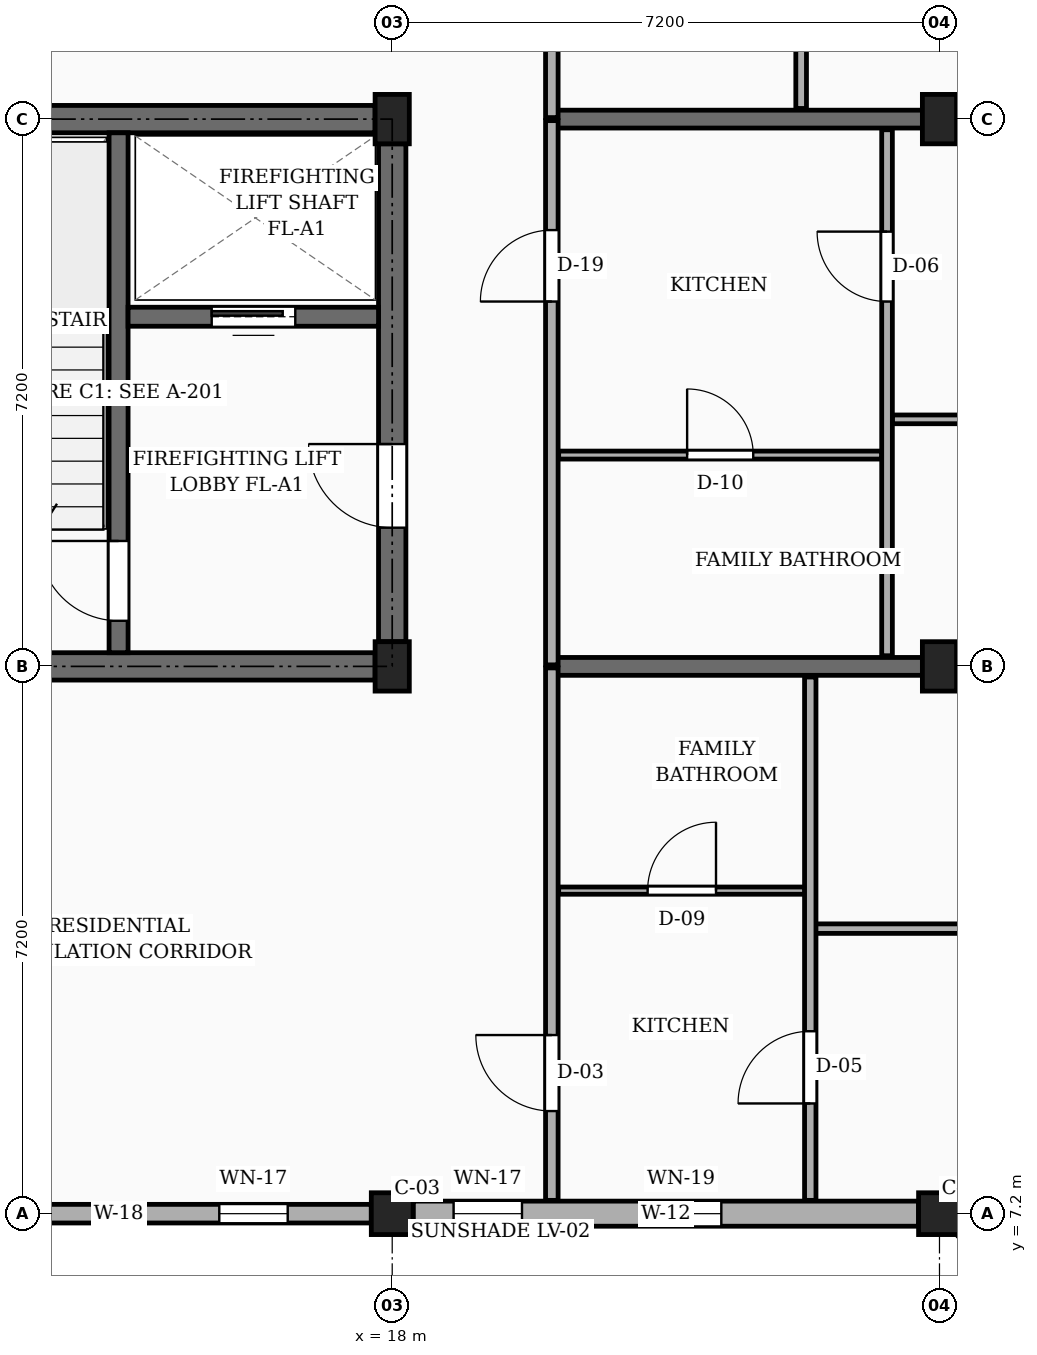
"""IFC4 building model, lengths in metres.
Left out: names, types, materials, properties, quantities, classifications, styles, units other than length and angle.
Written with IfcOpenShell. Run it as: python <this file> out.ifc"""

import sys

from ifc_helpers import new_model, si_unit, direction, frame, frame_2d, origin, origin_2d, place, context, subcontext, project, spatial, rectangle, extrude, element, fill, save


model = new_model("IFC4")
c1 = context("Model", 3, precision=1e-05, world=origin(), true_north=direction((0.0, 1.0)))
c2 = subcontext(c1, "Body", "Model", "MODEL_VIEW")
j1 = project(units=[si_unit("LENGTHUNIT", "METRE"), si_unit("PLANEANGLEUNIT", "RADIAN")], contexts=[c1])
p1 = place(None, origin())
s1 = spatial("IfcSite", under=j1, at=p1, CompositionType="ELEMENT")
p2 = place(p1, origin())
s2 = spatial("IfcBuilding", under=s1, at=p2, CompositionType="ELEMENT")
p3 = place(p2, frame((0.0, 0.0, 17.1)))
s3 = spatial("IfcBuildingStorey", under=s2, at=p3, CompositionType="ELEMENT", Elevation=17.1)
p4 = place(p3, frame((18.0, 7.2, 0.0), z_axis=(0.0, 0.0, 1.0), x_axis=(1.0, 0.0, 0.0)))
e1 = element("IfcColumn", 1, at=p4, inside=s3, PredefinedType="COLUMN", context=c2, shape_type="SweptSolid", body=[
    extrude(rectangle(XDim=0.55, YDim=0.55, at=origin_2d()), origin(), (0.0, 0.0, 1.0), 3.15),
])
for number, where, z_axis, x_axis in (
    (2, (18.0, 14.4, 0.0), (0.0, 0.0, 1.0), (1.0, 0.0, 0.0)),
    (3, (18.0, 21.6, 0.0), (0.0, 0.0, 1.0), (1.0, 0.0, 0.0)),
):
    element("IfcColumn", number, at=place(p3, frame(where, z_axis=z_axis, x_axis=x_axis)), inside=s3, PredefinedType="COLUMN", context=c2, shape_type="SweptSolid", body=[
        extrude(rectangle(XDim=0.45, YDim=0.65, at=origin_2d()), origin(), (0.0, 0.0, 1.0), 3.15),
    ])
p5 = place(p3, frame((25.2, 7.2, 0.0), z_axis=(0.0, 0.0, 1.0), x_axis=(1.0, 0.0, 0.0)))
e4 = element("IfcColumn", 4, at=p5, inside=s3, PredefinedType="COLUMN", context=c2, shape_type="SweptSolid", body=[
    extrude(rectangle(XDim=0.55, YDim=0.55, at=origin_2d()), origin(), (0.0, 0.0, 1.0), 3.15),
])
for number, where, z_axis, x_axis in (
    (5, (25.2, 14.4, 0.0), (0.0, 0.0, 1.0), (1.0, 0.0, 0.0)),
    (6, (25.2, 21.6, 0.0), (0.0, 0.0, 1.0), (1.0, 0.0, 0.0)),
):
    element("IfcColumn", number, at=place(p3, frame(where, z_axis=z_axis, x_axis=x_axis)), inside=s3, PredefinedType="COLUMN", context=c2, shape_type="SweptSolid", body=[
        extrude(rectangle(XDim=0.45, YDim=0.65, at=origin_2d()), origin(), (0.0, 0.0, 1.0), 3.15),
    ])
for number, where, z_axis, x_axis in (
    (7, (20.1, 14.4, 0.0), (0.0, 0.0, 1.0), (1.0, 0.0, 0.0)),
    (8, (20.1, 21.6, 0.0), (0.0, 0.0, 1.0), (1.0, 0.0, 0.0)),
):
    element("IfcWall", number, at=place(p3, frame(where, z_axis=z_axis, x_axis=x_axis)), inside=s3, PredefinedType="SOLIDWALL", context=c2, shape_type="SweptSolid", body=[
        extrude(rectangle(XDim=12.025, YDim=0.235, at=frame_2d((6.012, 0.0))), origin(), (0.0, 0.0, 1.0), 2.17),
    ])
p6 = place(p3, frame((11.075, 7.2, 0.0), z_axis=(0.0, 0.0, 1.0), x_axis=(1.0, 0.0, 0.0)))
e9 = element("IfcWall", 9, at=p6, inside=s3, PredefinedType="SOLIDWALL", context=c2, shape_type="SweptSolid", body=[
    extrude(rectangle(XDim=6.65, YDim=0.245, at=frame_2d((3.325, 0.0))), origin(), (0.0, 0.0, 1.0), 2.44),
])
p7 = place(p6, frame((0.45, 0.0, 0.78)))
e10 = element("IfcOpeningElement", 10, at=p7, cuts=e9, PredefinedType="OPENING", context=c2, shape_type="SweptSolid", body=[
    extrude(rectangle(XDim=1.36, YDim=1.26, at=frame_2d((0.68, 0.63))), frame((0.0, 0.133, 0.0), z_axis=(0.0, -1.0, 0.0), x_axis=(1.0, 0.0, 0.0)), (0.0, 0.0, 1.0), 0.265),
])
p8 = place(p6, frame((4.65, 0.0, 0.78)))
e11 = element("IfcOpeningElement", 11, at=p8, cuts=e9, PredefinedType="OPENING", context=c2, shape_type="SweptSolid", body=[
    extrude(rectangle(XDim=0.9, YDim=1.36, at=frame_2d((0.45, 0.68))), frame((0.0, 0.133, 0.0), z_axis=(0.0, -1.0, 0.0), x_axis=(1.0, 0.0, 0.0)), (0.0, 0.0, 1.0), 0.265),
])
p9 = place(p3, frame((18.275, 7.2, 0.0), z_axis=(0.0, 0.0, 1.0), x_axis=(1.0, 0.0, 0.0)))
e12 = element("IfcWall", 12, at=p9, inside=s3, PredefinedType="SOLIDWALL", context=c2, shape_type="SweptSolid", body=[
    extrude(rectangle(XDim=6.65, YDim=0.33, at=frame_2d((3.325, 0.0))), origin(), (0.0, 0.0, 1.0), 2.44),
])
p10 = place(p9, frame((0.532, 0.0, 0.78)))
e13 = element("IfcOpeningElement", 13, at=p10, cuts=e12, PredefinedType="OPENING", context=c2, shape_type="SweptSolid", body=[
    extrude(rectangle(XDim=0.9, YDim=1.36, at=frame_2d((0.45, 0.68))), frame((0.0, 0.175, 0.0), z_axis=(0.0, -1.0, 0.0), x_axis=(1.0, 0.0, 0.0)), (0.0, 0.0, 1.0), 0.35),
])
p11 = place(p9, frame((2.995, 0.0, 0.78)))
e14 = element("IfcOpeningElement", 14, at=p11, cuts=e12, PredefinedType="OPENING", context=c2, shape_type="SweptSolid", body=[
    extrude(rectangle(XDim=1.06, YDim=1.36, at=frame_2d((0.53, 0.68))), frame((0.0, 0.175, 0.0), z_axis=(0.0, -1.0, 0.0), x_axis=(1.0, 0.0, 0.0)), (0.0, 0.0, 1.0), 0.35),
])
p12 = place(p3, frame((11.025, 21.6, 0.0), z_axis=(0.0, 0.0, 1.0), x_axis=(1.0, 0.0, 0.0)))
e15 = element("IfcWall", 15, at=p12, inside=s3, PredefinedType="SHEAR", context=c2, shape_type="SweptSolid", body=[
    extrude(rectangle(XDim=6.75, YDim=0.36, at=frame_2d((3.375, 0.0))), origin(), (0.0, 0.0, 1.0), 2.87),
])
p13 = place(p3, frame((18.0, 14.725, 0.0), z_axis=(0.0, 0.0, 1.0), x_axis=(0.0, 1.0, 0.0)))
e16 = element("IfcWall", 16, at=p13, inside=s3, PredefinedType="SHEAR", context=c2, shape_type="SweptSolid", body=[
    extrude(rectangle(XDim=6.55, YDim=0.36, at=frame_2d((3.275, 0.0))), origin(), (0.0, 0.0, 1.0), 2.87),
])
p14 = place(p13, frame((1.5, 0.0, 0.0)))
e17 = element("IfcOpeningElement", 17, at=p14, cuts=e16, PredefinedType="OPENING", context=c2, shape_type="SweptSolid", body=[
    extrude(rectangle(XDim=1.1, YDim=2.15, at=frame_2d((0.55, 1.075))), frame((0.0, 0.19, 0.0), z_axis=(0.0, -1.0, 0.0), x_axis=(1.0, 0.0, 0.0)), (0.0, 0.0, 1.0), 0.38),
])
p15 = place(p3, frame((11.025, 14.4, 0.0), z_axis=(0.0, 0.0, 1.0), x_axis=(1.0, 0.0, 0.0)))
e18 = element("IfcWall", 18, at=p15, inside=s3, PredefinedType="SHEAR", context=c2, shape_type="SweptSolid", body=[
    extrude(rectangle(XDim=6.75, YDim=0.36, at=frame_2d((3.375, 0.0))), origin(), (0.0, 0.0, 1.0), 2.87),
])
p16 = place(p3, frame((14.4, 14.58, 0.0), z_axis=(0.0, 0.0, 1.0), x_axis=(0.0, 1.0, 0.0)))
e19 = element("IfcWall", 19, at=p16, inside=s3, PredefinedType="SHEAR", context=c2, shape_type="SweptSolid", body=[
    extrude(rectangle(XDim=6.84, YDim=0.25, at=frame_2d((3.42, 0.0))), origin(), (0.0, 0.0, 1.0), 2.87),
])
p17 = place(p16, frame((0.42, 0.0, 0.0)))
e20 = element("IfcOpeningElement", 20, at=p17, cuts=e19, PredefinedType="OPENING", context=c2, shape_type="SweptSolid", body=[
    extrude(rectangle(XDim=1.05, YDim=2.15, at=frame_2d((0.525, 1.075))), frame((0.0, 0.135, 0.0), z_axis=(0.0, -1.0, 0.0), x_axis=(1.0, 0.0, 0.0)), (0.0, 0.0, 1.0), 0.27),
])
p18 = place(p3, frame((14.525, 19.0, 0.0), z_axis=(0.0, 0.0, 1.0), x_axis=(1.0, 0.0, 0.0)))
e21 = element("IfcWall", 21, at=p18, inside=s3, PredefinedType="SHEAR", context=c2, shape_type="SweptSolid", body=[
    extrude(rectangle(XDim=3.295, YDim=0.25, at=frame_2d((1.647, 0.0))), origin(), (0.0, 0.0, 1.0), 2.87),
])
p19 = place(p18, frame((1.1, 0.0, 0.0)))
e22 = element("IfcOpeningElement", 22, at=p19, cuts=e21, PredefinedType="OPENING", context=c2, shape_type="SweptSolid", body=[
    extrude(rectangle(XDim=1.1, YDim=2.2, at=frame_2d((0.55, 1.1))), frame((0.0, 0.135, 0.0), z_axis=(0.0, -1.0, 0.0), x_axis=(1.0, 0.0, 0.0)), (0.0, 0.0, 1.0), 0.27),
])
p20 = place(p3, frame((20.1, 7.375, 0.0), z_axis=(0.0, 0.0, 1.0), x_axis=(0.0, 1.0, 0.0)))
e23 = element("IfcWall", 23, at=p20, inside=s3, PredefinedType="PARTITIONING", context=c2, shape_type="SweptSolid", body=[
    extrude(rectangle(XDim=7.005, YDim=0.165, at=frame_2d((3.502, 0.0))), origin(), (0.0, 0.0, 1.0), 2.305),
])
p21 = place(p20, frame((1.175, 0.0, 0.0)))
e24 = element("IfcOpeningElement", 24, at=p21, cuts=e23, PredefinedType="OPENING", context=c2, shape_type="SweptSolid", body=[
    extrude(rectangle(XDim=1.0, YDim=2.15, at=frame_2d((0.5, 1.075))), frame((0.0, 0.093, 0.0), z_axis=(0.0, -1.0, 0.0), x_axis=(1.0, 0.0, 0.0)), (0.0, 0.0, 1.0), 0.185),
])
p22 = place(p3, frame((20.1, 14.42, 0.0), z_axis=(0.0, 0.0, 1.0), x_axis=(0.0, 1.0, 0.0)))
e25 = element("IfcWall", 25, at=p22, inside=s3, PredefinedType="PARTITIONING", context=c2, shape_type="SweptSolid", body=[
    extrude(rectangle(XDim=7.16, YDim=0.165, at=frame_2d((3.58, 0.0))), origin(), (0.0, 0.0, 1.0), 2.305),
])
p23 = place(p22, frame((4.78, 0.0, 0.0)))
e26 = element("IfcOpeningElement", 26, at=p23, cuts=e25, PredefinedType="OPENING", context=c2, shape_type="SweptSolid", body=[
    extrude(rectangle(XDim=0.94, YDim=2.12, at=frame_2d((0.47, 1.06))), frame((0.0, 0.093, 0.0), z_axis=(0.0, -1.0, 0.0), x_axis=(1.0, 0.0, 0.0)), (0.0, 0.0, 1.0), 0.185),
])
p24 = place(p3, frame((20.1, 21.62, 0.0), z_axis=(0.0, 0.0, 1.0), x_axis=(0.0, 1.0, 0.0)))
e27 = element("IfcWall", 27, at=p24, inside=s3, PredefinedType="PARTITIONING", context=c2, shape_type="SweptSolid", body=[
    extrude(rectangle(XDim=7.16, YDim=0.165, at=frame_2d((3.58, 0.0))), origin(), (0.0, 0.0, 1.0), 2.305),
])
p25 = place(p24, frame((1.33, 0.0, 0.0)))
e28 = element("IfcOpeningElement", 28, at=p25, cuts=e27, PredefinedType="OPENING", context=c2, shape_type="SweptSolid", body=[
    extrude(rectangle(XDim=1.14, YDim=2.18, at=frame_2d((0.57, 1.09))), frame((0.0, 0.093, 0.0), z_axis=(0.0, -1.0, 0.0), x_axis=(1.0, 0.0, 0.0)), (0.0, 0.0, 1.0), 0.185),
])
p26 = place(p3, frame((23.57, 10.95, 0.0), z_axis=(0.0, 0.0, 1.0), x_axis=(1.0, 0.0, 0.0)))
e29 = element("IfcWall", 29, at=p26, inside=s3, PredefinedType="PARTITIONING", context=c2, shape_type="SweptSolid", body=[
    extrude(rectangle(XDim=8.655, YDim=0.125, at=frame_2d((4.328, 0.0))), origin(), (0.0, 0.0, 1.0), 2.305),
])
p27 = place(p26, frame((3.877, 0.0, 0.0)))
e30 = element("IfcOpeningElement", 30, at=p27, cuts=e29, PredefinedType="OPENING", context=c2, shape_type="SweptSolid", body=[
    extrude(rectangle(XDim=0.9, YDim=2.1, at=frame_2d((0.45, 1.05))), frame((0.0, 0.073, 0.0), z_axis=(0.0, -1.0, 0.0), x_axis=(1.0, 0.0, 0.0)), (0.0, 0.0, 1.0), 0.145),
])
p28 = place(p3, frame((20.19, 11.45, 0.0), z_axis=(0.0, 0.0, 1.0), x_axis=(1.0, 0.0, 0.0)))
e31 = element("IfcWall", 31, at=p28, inside=s3, PredefinedType="PARTITIONING", context=c2, shape_type="SweptSolid", body=[
    extrude(rectangle(XDim=3.24, YDim=0.095, at=frame_2d((1.62, 0.0))), origin(), (0.0, 0.0, 1.0), 2.305),
])
p29 = place(p28, frame((1.17, 0.0, 0.0)))
e32 = element("IfcOpeningElement", 32, at=p29, cuts=e31, PredefinedType="OPENING", context=c2, shape_type="SweptSolid", body=[
    extrude(rectangle(XDim=0.9, YDim=2.05, at=frame_2d((0.45, 1.025))), frame((0.0, 0.058, 0.0), z_axis=(0.0, -1.0, 0.0), x_axis=(1.0, 0.0, 0.0)), (0.0, 0.0, 1.0), 0.115),
])
p30 = place(p3, frame((23.5, 7.375, 0.0), z_axis=(0.0, 0.0, 1.0), x_axis=(0.0, 1.0, 0.0)))
e33 = element("IfcWall", 33, at=p30, inside=s3, PredefinedType="PARTITIONING", context=c2, shape_type="SweptSolid", body=[
    extrude(rectangle(XDim=6.885, YDim=0.15, at=frame_2d((3.442, 0.0))), origin(), (0.0, 0.0, 1.0), 2.305),
])
p31 = place(p30, frame((1.275, 0.0, 0.0)))
e34 = element("IfcOpeningElement", 34, at=p31, cuts=e33, PredefinedType="OPENING", context=c2, shape_type="SweptSolid", body=[
    extrude(rectangle(XDim=0.95, YDim=2.1, at=frame_2d((0.475, 1.05))), frame((0.0, 0.085, 0.0), z_axis=(0.0, -1.0, 0.0), x_axis=(1.0, 0.0, 0.0)), (0.0, 0.0, 1.0), 0.17),
])
p32 = place(p3, frame((24.58, 17.65, 0.0), z_axis=(0.0, 0.0, 1.0), x_axis=(1.0, 0.0, 0.0)))
e35 = element("IfcWall", 35, at=p32, inside=s3, PredefinedType="PARTITIONING", context=c2, shape_type="SweptSolid", body=[
    extrude(rectangle(XDim=7.645, YDim=0.115, at=frame_2d((3.823, 0.0))), origin(), (0.0, 0.0, 1.0), 2.305),
])
p33 = place(p32, frame((3.383, 0.0, 0.0)))
e36 = element("IfcOpeningElement", 36, at=p33, cuts=e35, PredefinedType="OPENING", context=c2, shape_type="SweptSolid", body=[
    extrude(rectangle(XDim=0.88, YDim=2.08, at=frame_2d((0.44, 1.04))), frame((0.0, 0.067, 0.0), z_axis=(0.0, -1.0, 0.0), x_axis=(1.0, 0.0, 0.0)), (0.0, 0.0, 1.0), 0.135),
])
p34 = place(p3, frame((20.19, 17.18, 0.0), z_axis=(0.0, 0.0, 1.0), x_axis=(1.0, 0.0, 0.0)))
e37 = element("IfcWall", 37, at=p34, inside=s3, PredefinedType="PARTITIONING", context=c2, shape_type="SweptSolid", body=[
    extrude(rectangle(XDim=4.25, YDim=0.105, at=frame_2d((2.125, 0.0))), origin(), (0.0, 0.0, 1.0), 2.305),
])
p35 = place(p34, frame((1.69, 0.0, 0.0)))
e38 = element("IfcOpeningElement", 38, at=p35, cuts=e37, PredefinedType="OPENING", context=c2, shape_type="SweptSolid", body=[
    extrude(rectangle(XDim=0.87, YDim=2.05, at=frame_2d((0.435, 1.025))), frame((0.0, 0.062, 0.0), z_axis=(0.0, -1.0, 0.0), x_axis=(1.0, 0.0, 0.0)), (0.0, 0.0, 1.0), 0.125),
])
p36 = place(p3, frame((24.51, 14.54, 0.0), z_axis=(0.0, 0.0, 1.0), x_axis=(0.0, 1.0, 0.0)))
e39 = element("IfcWall", 39, at=p36, inside=s3, PredefinedType="PARTITIONING", context=c2, shape_type="SweptSolid", body=[
    extrude(rectangle(XDim=6.92, YDim=0.14, at=frame_2d((3.46, 0.0))), origin(), (0.0, 0.0, 1.0), 2.305),
])
p37 = place(p36, frame((4.66, 0.0, 0.0)))
e40 = element("IfcOpeningElement", 40, at=p37, cuts=e39, PredefinedType="OPENING", context=c2, shape_type="SweptSolid", body=[
    extrude(rectangle(XDim=0.92, YDim=2.1, at=frame_2d((0.46, 1.05))), frame((0.0, 0.08, 0.0), z_axis=(0.0, -1.0, 0.0), x_axis=(1.0, 0.0, 0.0)), (0.0, 0.0, 1.0), 0.16),
])
p38 = place(p3, frame((23.38, 21.74, 0.0), z_axis=(0.0, 0.0, 1.0), x_axis=(0.0, 1.0, 0.0)))
e41 = element("IfcWall", 41, at=p38, inside=s3, PredefinedType="PARTITIONING", context=c2, shape_type="SweptSolid", body=[
    extrude(rectangle(XDim=6.92, YDim=0.14, at=frame_2d((3.46, 0.0))), origin(), (0.0, 0.0, 1.0), 2.305),
])
p39 = place(p38, frame((1.31, 0.0, 0.0)))
e42 = element("IfcOpeningElement", 42, at=p39, cuts=e41, PredefinedType="OPENING", context=c2, shape_type="SweptSolid", body=[
    extrude(rectangle(XDim=0.95, YDim=2.1, at=frame_2d((0.475, 1.05))), frame((0.0, 0.08, 0.0), z_axis=(0.0, -1.0, 0.0), x_axis=(1.0, 0.0, 0.0)), (0.0, 0.0, 1.0), 0.16),
])
p40 = place(p8, origin())
e43 = element("IfcWindow", 43, at=p40, inside=s3, PartitioningType="SINGLE_PANEL", PredefinedType="WINDOW", context=c2, shape_type="SweptSolid", body=[
    extrude(rectangle(XDim=0.9, YDim=1.36, at=frame_2d((0.45, 0.68))), frame((0.0, 0.03, 0.0), z_axis=(0.0, -1.0, 0.0), x_axis=(1.0, 0.0, 0.0)), (0.0, 0.0, 1.0), 0.06),
])
fill(e11, e43)
p41 = place(p10, origin())
e44 = element("IfcWindow", 44, at=p41, inside=s3, PartitioningType="SINGLE_PANEL", PredefinedType="WINDOW", context=c2, shape_type="SweptSolid", body=[
    extrude(rectangle(XDim=0.9, YDim=1.36, at=frame_2d((0.45, 0.68))), frame((0.0, 0.03, 0.0), z_axis=(0.0, -1.0, 0.0), x_axis=(1.0, 0.0, 0.0)), (0.0, 0.0, 1.0), 0.06),
])
fill(e13, e44)
p42 = place(p11, origin())
e45 = element("IfcWindow", 45, at=p42, inside=s3, PartitioningType="SINGLE_PANEL", PredefinedType="WINDOW", context=c2, shape_type="SweptSolid", body=[
    extrude(rectangle(XDim=1.06, YDim=1.36, at=frame_2d((0.53, 0.68))), frame((0.0, 0.03, 0.0), z_axis=(0.0, -1.0, 0.0), x_axis=(1.0, 0.0, 0.0)), (0.0, 0.0, 1.0), 0.06),
])
fill(e14, e45)
p43 = place(p14, frame((1.1, 0.0, 0.0), z_axis=(0.0, 0.0, 1.0), x_axis=(-1.0, 0.0, 0.0)))
e46 = element("IfcDoor", 46, at=p43, inside=s3, OperationType="SINGLE_SWING_RIGHT", PredefinedType="DOOR", context=c2, shape_type="SweptSolid", body=[
    extrude(rectangle(XDim=1.1, YDim=2.15, at=frame_2d((0.55, 1.075))), frame((0.0, 0.025, 0.0), z_axis=(0.0, -1.0, 0.0), x_axis=(1.0, 0.0, 0.0)), (0.0, 0.0, 1.0), 0.05),
])
fill(e17, e46)
p44 = place(p17, origin())
e47 = element("IfcDoor", 47, at=p44, inside=s3, OperationType="SINGLE_SWING_RIGHT", PredefinedType="DOOR", context=c2, shape_type="SweptSolid", body=[
    extrude(rectangle(XDim=1.05, YDim=2.15, at=frame_2d((0.525, 1.075))), frame((0.0, 0.025, 0.0), z_axis=(0.0, -1.0, 0.0), x_axis=(1.0, 0.0, 0.0)), (0.0, 0.0, 1.0), 0.05),
])
fill(e20, e47)
p45 = place(p19, origin())
e48 = element("IfcDoor", 48, at=p45, inside=s3, OperationType="SLIDING_TO_LEFT", PredefinedType="DOOR", context=c2, shape_type="SweptSolid", body=[
    extrude(rectangle(XDim=1.1, YDim=2.2, at=frame_2d((0.55, 1.1))), frame((0.0, 0.025, 0.0), z_axis=(0.0, -1.0, 0.0), x_axis=(1.0, 0.0, 0.0)), (0.0, 0.0, 1.0), 0.05),
])
fill(e22, e48)
p46 = place(p21, origin())
e49 = element("IfcDoor", 49, at=p46, inside=s3, OperationType="SINGLE_SWING_RIGHT", PredefinedType="DOOR", context=c2, shape_type="SweptSolid", body=[
    extrude(rectangle(XDim=1.0, YDim=2.15, at=frame_2d((0.5, 1.075))), frame((0.0, 0.025, 0.0), z_axis=(0.0, -1.0, 0.0), x_axis=(1.0, 0.0, 0.0)), (0.0, 0.0, 1.0), 0.05),
])
fill(e24, e49)
p47 = place(p23, origin())
e50 = element("IfcDoor", 50, at=p47, inside=s3, OperationType="SINGLE_SWING_LEFT", PredefinedType="DOOR", context=c2, shape_type="SweptSolid", body=[
    extrude(rectangle(XDim=0.94, YDim=2.12, at=frame_2d((0.47, 1.06))), frame((0.0, 0.025, 0.0), z_axis=(0.0, -1.0, 0.0), x_axis=(1.0, 0.0, 0.0)), (0.0, 0.0, 1.0), 0.05),
])
fill(e26, e50)
p48 = place(p29, origin())
e51 = element("IfcDoor", 51, at=p48, inside=s3, OperationType="SINGLE_SWING_RIGHT", PredefinedType="DOOR", context=c2, shape_type="SweptSolid", body=[
    extrude(rectangle(XDim=0.9, YDim=2.05, at=frame_2d((0.45, 1.025))), frame((0.0, 0.025, 0.0), z_axis=(0.0, -1.0, 0.0), x_axis=(1.0, 0.0, 0.0)), (0.0, 0.0, 1.0), 0.05),
])
fill(e32, e51)
p49 = place(p31, origin())
e52 = element("IfcDoor", 52, at=p49, inside=s3, OperationType="SINGLE_SWING_LEFT", PredefinedType="DOOR", context=c2, shape_type="SweptSolid", body=[
    extrude(rectangle(XDim=0.95, YDim=2.1, at=frame_2d((0.475, 1.05))), frame((0.0, 0.025, 0.0), z_axis=(0.0, -1.0, 0.0), x_axis=(1.0, 0.0, 0.0)), (0.0, 0.0, 1.0), 0.05),
])
fill(e34, e52)
p50 = place(p35, origin())
e53 = element("IfcDoor", 53, at=p50, inside=s3, OperationType="SINGLE_SWING_LEFT", PredefinedType="DOOR", context=c2, shape_type="SweptSolid", body=[
    extrude(rectangle(XDim=0.87, YDim=2.05, at=frame_2d((0.435, 1.025))), frame((0.0, 0.025, 0.0), z_axis=(0.0, -1.0, 0.0), x_axis=(1.0, 0.0, 0.0)), (0.0, 0.0, 1.0), 0.05),
])
fill(e38, e53)
p51 = place(p37, origin())
e54 = element("IfcDoor", 54, at=p51, inside=s3, OperationType="SINGLE_SWING_RIGHT", PredefinedType="DOOR", context=c2, shape_type="SweptSolid", body=[
    extrude(rectangle(XDim=0.92, YDim=2.1, at=frame_2d((0.46, 1.05))), frame((0.0, 0.025, 0.0), z_axis=(0.0, -1.0, 0.0), x_axis=(1.0, 0.0, 0.0)), (0.0, 0.0, 1.0), 0.05),
])
fill(e40, e54)
save(model, sys.argv[1])
